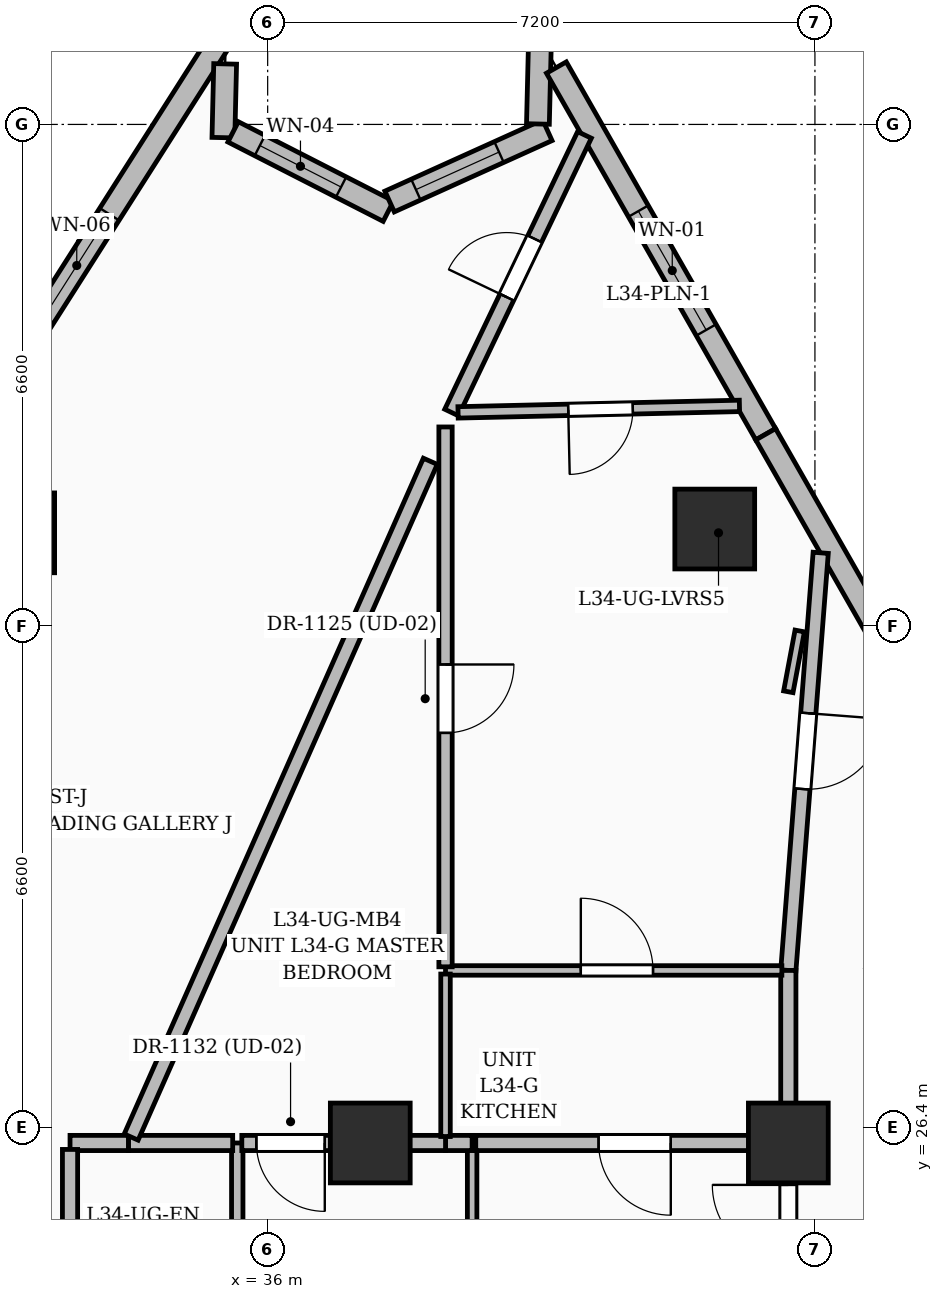
"""IFC4 building model, lengths in metres.
Left out: names, types, materials, properties, quantities, classifications, styles, units other than length and angle.
Written with IfcOpenShell. Run it as: python <this file> out.ifc"""

import sys

from ifc_helpers import new_model, si_unit, direction, frame, frame_2d, origin, origin_2d, place, context, subcontext, project, spatial, rectangle, extrude, element, fill, save


model = new_model("IFC4")
c1 = context("Model", 3, precision=1e-05, world=origin(), true_north=direction((0.0, 1.0)))
c2 = subcontext(c1, "Body", "Model", "MODEL_VIEW")
j1 = project(units=[si_unit("LENGTHUNIT", "METRE"), si_unit("PLANEANGLEUNIT", "RADIAN")], contexts=[c1])
p1 = place(None, origin())
s1 = spatial("IfcSite", under=j1, at=p1, CompositionType="ELEMENT")
p2 = place(p1, origin())
s2 = spatial("IfcBuilding", under=s1, at=p2, CompositionType="ELEMENT")
p3 = place(p2, frame((0.0, 0.0, 135.6)))
s3 = spatial("IfcBuildingStorey", under=s2, at=p3, CompositionType="ELEMENT", Elevation=135.6)
for number, where, z_axis, x_axis in (
    (1, (42.85, 26.2, 0.0), (0.0, 0.0, 1.0), (1.0, 0.0, 0.0)),
    (2, (37.35, 26.2, 0.0), (0.0, 0.0, 1.0), (1.0, 0.0, 0.0)),
    (3, (41.882, 34.277, 0.0), (0.0, 0.0, 1.0), (1.0, 0.0, 0.0)),
    (4, (32.672, 34.227, 0.0), (0.0, 0.0, 1.0), (1.0, 0.0, 0.0)),
):
    element("IfcColumn", number, at=place(p3, frame(where, z_axis=z_axis, x_axis=x_axis)), inside=s3, PredefinedType="COLUMN", context=c2, shape_type="SweptSolid", body=[
        extrude(rectangle(XDim=1.05, YDim=1.05, at=origin_2d()), origin(), (0.0, 0.0, 1.0), 3.6),
    ])
p4 = place(p3, frame((31.998, 35.403, 0.0), z_axis=(0.0, 0.0, 1.0), x_axis=(0.537115953095, 0.843508419004, 0.0)))
e5 = element("IfcWall", 5, at=p4, inside=s3, PredefinedType="SOLIDWALL", context=c2, shape_type="SweptSolid", body=[
    extrude(rectangle(XDim=6.569, YDim=0.3, at=frame_2d((3.285, 0.0))), origin(), (0.0, 0.0, 1.0), 3.35),
])
p5 = place(p4, frame((1.975, 0.0, 0.55)))
e6 = element("IfcOpeningElement", 6, at=p5, cuts=e5, PredefinedType="OPENING", context=c2, shape_type="SweptSolid", body=[
    extrude(rectangle(XDim=1.6, YDim=2.2, at=frame_2d((0.8, 1.1))), frame((0.0, 0.16, 0.0), z_axis=(0.0, -1.0, 0.0), x_axis=(1.0, 0.0, 0.0)), (0.0, 0.0, 1.0), 0.32),
])
p6 = place(p3, frame((35.441, 40.396, 0.0), z_axis=(0.0, 0.0, 1.0), x_axis=(-0.023898557354, -0.999714388691, 0.0)))
e7 = element("IfcWall", 7, at=p6, inside=s3, PredefinedType="SOLIDWALL", context=c2, shape_type="SweptSolid", body=[
    extrude(rectangle(XDim=0.97, YDim=0.3, at=frame_2d((0.485, 0.0))), origin(), (0.0, 0.0, 1.0), 3.35),
])
p7 = place(p3, frame((35.546, 39.502, 0.0), z_axis=(0.0, 0.0, 1.0), x_axis=(0.890388661124, -0.455201089786, 0.0)))
e8 = element("IfcWall", 8, at=p7, inside=s3, PredefinedType="SOLIDWALL", context=c2, shape_type="SweptSolid", body=[
    extrude(rectangle(XDim=2.293, YDim=0.3, at=frame_2d((1.147, 0.0))), origin(), (0.0, 0.0, 1.0), 3.35),
])
p8 = place(p7, frame((0.395, 0.0, 0.8)))
e9 = element("IfcOpeningElement", 9, at=p8, cuts=e8, PredefinedType="OPENING", context=c2, shape_type="SweptSolid", body=[
    extrude(rectangle(XDim=1.2, YDim=1.8, at=frame_2d((0.6, 0.9))), frame((0.0, 0.16, 0.0), z_axis=(0.0, -1.0, 0.0), x_axis=(1.0, 0.0, 0.0)), (0.0, 0.0, 1.0), 0.32),
])
p9 = place(p3, frame((37.604, 38.586, 0.0), z_axis=(0.0, 0.0, 1.0), x_axis=(0.911256421967, 0.411839451029, 0.0)))
e10 = element("IfcWall", 10, at=p9, inside=s3, PredefinedType="SOLIDWALL", context=c2, shape_type="SweptSolid", body=[
    extrude(rectangle(XDim=2.278, YDim=0.3, at=frame_2d((1.139, 0.0))), origin(), (0.0, 0.0, 1.0), 3.35),
])
p10 = place(p9, frame((0.38, 0.0, 0.8)))
e11 = element("IfcOpeningElement", 11, at=p10, cuts=e10, PredefinedType="OPENING", context=c2, shape_type="SweptSolid", body=[
    extrude(rectangle(XDim=1.2, YDim=1.8, at=frame_2d((0.6, 0.9))), frame((0.0, 0.16, 0.0), z_axis=(0.0, -1.0, 0.0), x_axis=(1.0, 0.0, 0.0)), (0.0, 0.0, 1.0), 0.32),
])
p11 = place(p3, frame((39.555, 39.606, 0.0), z_axis=(0.0, 0.0, 1.0), x_axis=(0.024600187161, 0.999697369603, 0.0)))
e12 = element("IfcWall", 12, at=p11, inside=s3, PredefinedType="SOLIDWALL", context=c2, shape_type="SweptSolid", body=[
    extrude(rectangle(XDim=1.26, YDim=0.3, at=frame_2d((0.63, 0.0))), origin(), (0.0, 0.0, 1.0), 3.35),
])
p12 = place(p3, frame((39.799, 40.348, 0.0), z_axis=(0.0, 0.0, 1.0), x_axis=(0.495693940787, -0.868497275222, 0.0)))
e13 = element("IfcWall", 13, at=p12, inside=s3, PredefinedType="SOLIDWALL", context=c2, shape_type="SweptSolid", body=[
    extrude(rectangle(XDim=5.555, YDim=0.3, at=frame_2d((2.777, 0.0))), origin(), (0.0, 0.0, 1.0), 3.35),
])
p13 = place(p12, frame((2.175, 0.0, 0.6)))
e14 = element("IfcOpeningElement", 14, at=p13, cuts=e13, PredefinedType="OPENING", context=c2, shape_type="SweptSolid", body=[
    extrude(rectangle(XDim=1.8, YDim=2.1, at=frame_2d((0.9, 1.05))), frame((0.0, 0.16, 0.0), z_axis=(0.0, -1.0, 0.0), x_axis=(1.0, 0.0, 0.0)), (0.0, 0.0, 1.0), 0.32),
])
p14 = place(p3, frame((42.552, 35.524, 0.0), z_axis=(0.0, 0.0, 1.0), x_axis=(0.495688482465, -0.86850039053, 0.0)))
e15 = element("IfcWall", 15, at=p14, inside=s3, PredefinedType="SOLIDWALL", context=c2, shape_type="SweptSolid", body=[
    extrude(rectangle(XDim=6.129, YDim=0.3, at=frame_2d((3.065, 0.0))), origin(), (0.0, 0.0, 1.0), 3.35),
])
p15 = place(p14, frame((2.975, 0.0, 0.55)))
e16 = element("IfcOpeningElement", 16, at=p15, cuts=e15, PredefinedType="OPENING", context=c2, shape_type="SweptSolid", body=[
    extrude(rectangle(XDim=1.6, YDim=2.2, at=frame_2d((0.8, 1.1))), frame((0.0, 0.16, 0.0), z_axis=(0.0, -1.0, 0.0), x_axis=(1.0, 0.0, 0.0)), (0.0, 0.0, 1.0), 0.32),
])
p16 = place(p3, frame((38.69, 26.2, 0.0), z_axis=(0.0, 0.0, 1.0), x_axis=(0.0, -1.0, 0.0)))
e17 = element("IfcWall", 17, at=p16, inside=s3, PredefinedType="PARTITIONING", context=c2, shape_type="SweptSolid", body=[
    extrude(rectangle(XDim=4.343, YDim=0.125, at=frame_2d((2.171, 0.0))), origin(), (0.0, 0.0, 1.0), 2.436),
])
p17 = place(p3, frame((42.85, 24.285, 0.0), z_axis=(0.0, 0.0, 1.0), x_axis=(0.0, 1.0, 0.0)))
e18 = element("IfcWall", 18, at=p17, inside=s3, PredefinedType="PARTITIONING", context=c2, shape_type="SweptSolid", body=[
    extrude(rectangle(XDim=1.915, YDim=0.2, at=frame_2d((0.958, 0.0))), origin(), (0.0, 0.0, 1.0), 2.436),
])
p18 = place(p17, frame((0.364, 0.0, 0.0)))
e19 = element("IfcOpeningElement", 19, at=p18, cuts=e18, PredefinedType="OPENING", context=c2, shape_type="SweptSolid", body=[
    extrude(rectangle(XDim=1.0, YDim=2.2, at=frame_2d((0.5, 1.1))), frame((0.0, 0.11, 0.0), z_axis=(0.0, -1.0, 0.0), x_axis=(1.0, 0.0, 0.0)), (0.0, 0.0, 1.0), 0.22),
])
p19 = place(p3, frame((42.765, 26.2, 0.0), z_axis=(0.0, 0.0, 1.0), x_axis=(-1.0, 0.0, 0.0)))
e20 = element("IfcWall", 20, at=p19, inside=s3, PredefinedType="PARTITIONING", context=c2, shape_type="SweptSolid", body=[
    extrude(rectangle(XDim=4.027, YDim=0.2, at=frame_2d((2.014, 0.0))), origin(), (0.0, 0.0, 1.0), 2.436),
])
p20 = place(p19, frame((1.461, 0.0, 0.0)))
e21 = element("IfcOpeningElement", 21, at=p20, cuts=e20, PredefinedType="OPENING", context=c2, shape_type="SweptSolid", body=[
    extrude(rectangle(XDim=0.95, YDim=2.2, at=frame_2d((0.475, 1.1))), frame((0.0, 0.11, 0.0), z_axis=(0.0, -1.0, 0.0), x_axis=(1.0, 0.0, 0.0)), (0.0, 0.0, 1.0), 0.22),
])
p21 = place(p3, frame((35.6, 21.84, 0.0), z_axis=(0.0, 0.0, 1.0), x_axis=(0.0, 1.0, 0.0)))
e22 = element("IfcWall", 22, at=p21, inside=s3, PredefinedType="PARTITIONING", context=c2, shape_type="SweptSolid", body=[
    extrude(rectangle(XDim=4.36, YDim=0.15, at=frame_2d((2.18, 0.0))), origin(), (0.0, 0.0, 1.0), 2.436),
])
p22 = place(p21, frame((1.74, 0.0, 0.0)))
e23 = element("IfcOpeningElement", 23, at=p22, cuts=e22, PredefinedType="OPENING", context=c2, shape_type="SweptSolid", body=[
    extrude(rectangle(XDim=0.85, YDim=2.1, at=frame_2d((0.425, 1.05))), frame((0.0, 0.085, 0.0), z_axis=(0.0, -1.0, 0.0), x_axis=(1.0, 0.0, 0.0)), (0.0, 0.0, 1.0), 0.17),
])
p23 = place(p3, frame((38.69, 26.2, 0.0), z_axis=(0.0, 0.0, 1.0), x_axis=(-1.0, 0.0, 0.0)))
e24 = element("IfcWall", 24, at=p23, inside=s3, PredefinedType="PARTITIONING", context=c2, shape_type="SweptSolid", body=[
    extrude(rectangle(XDim=0.35, YDim=0.2, at=frame_2d((0.175, 0.0))), origin(), (0.0, 0.0, 1.0), 2.436),
])
p24 = place(p3, frame((38.34, 26.2, 0.0), z_axis=(0.0, 0.0, 1.0), x_axis=(-1.0, 0.0, 0.0)))
e25 = element("IfcWall", 25, at=p24, inside=s3, PredefinedType="PARTITIONING", context=c2, shape_type="SweptSolid", body=[
    extrude(rectangle(XDim=2.68, YDim=0.2, at=frame_2d((1.34, 0.0))), origin(), (0.0, 0.0, 1.0), 2.436),
])
p25 = place(p24, frame((1.589, 0.0, 0.0)))
e26 = element("IfcOpeningElement", 26, at=p25, cuts=e25, PredefinedType="OPENING", context=c2, shape_type="SweptSolid", body=[
    extrude(rectangle(XDim=0.9, YDim=2.15, at=frame_2d((0.45, 1.075))), frame((0.0, 0.11, 0.0), z_axis=(0.0, -1.0, 0.0), x_axis=(1.0, 0.0, 0.0)), (0.0, 0.0, 1.0), 0.22),
])
p26 = place(p3, frame((34.17, 26.2, 0.0), z_axis=(0.0, 0.0, 1.0), x_axis=(-1.0, 0.0, 0.0)))
e27 = element("IfcWall", 27, at=p26, inside=s3, PredefinedType="PARTITIONING", context=c2, shape_type="SweptSolid", body=[
    extrude(rectangle(XDim=0.77, YDim=0.2, at=frame_2d((0.385, 0.0))), origin(), (0.0, 0.0, 1.0), 3.35),
])
p27 = place(p3, frame((33.4, 26.115, 0.0), z_axis=(0.0, 0.0, 1.0), x_axis=(0.0, -1.0, 0.0)))
e28 = element("IfcWall", 28, at=p27, inside=s3, PredefinedType="PARTITIONING", context=c2, shape_type="SweptSolid", body=[
    extrude(rectangle(XDim=4.245, YDim=0.2, at=frame_2d((2.123, 0.0))), origin(), (0.0, 0.0, 1.0), 2.709),
])
p28 = place(p3, frame((35.54, 26.2, 0.0), z_axis=(0.0, 0.0, 1.0), x_axis=(-1.0, 0.0, 0.0)))
e29 = element("IfcWall", 29, at=p28, inside=s3, PredefinedType="PARTITIONING", context=c2, shape_type="SweptSolid", body=[
    extrude(rectangle(XDim=1.37, YDim=0.2, at=frame_2d((0.685, 0.0))), origin(), (0.0, 0.0, 1.0), 2.709),
])
p29 = place(p3, frame((43.276, 33.964, 0.0), z_axis=(0.0, 0.0, 1.0), x_axis=(-0.077265658671, -0.997010540561, 0.0)))
e30 = element("IfcWall", 30, at=p29, inside=s3, PredefinedType="PARTITIONING", context=c2, shape_type="SweptSolid", body=[
    extrude(rectangle(XDim=5.51, YDim=0.2, at=frame_2d((2.755, 0.0))), origin(), (0.0, 0.0, 1.0), 2.372),
])
p30 = place(p29, frame((2.116, 0.0, 0.0)))
e31 = element("IfcOpeningElement", 31, at=p30, cuts=e30, PredefinedType="OPENING", context=c2, shape_type="SweptSolid", body=[
    extrude(rectangle(XDim=1.0, YDim=2.2, at=frame_2d((0.5, 1.1))), frame((0.0, 0.11, 0.0), z_axis=(0.0, -1.0, 0.0), x_axis=(1.0, 0.0, 0.0)), (0.0, 0.0, 1.0), 0.22),
])
p31 = place(p3, frame((42.85, 28.47, 0.0), z_axis=(0.0, 0.0, 1.0), x_axis=(0.0, -1.0, 0.0)))
e32 = element("IfcWall", 32, at=p31, inside=s3, PredefinedType="PARTITIONING", context=c2, shape_type="SweptSolid", body=[
    extrude(rectangle(XDim=2.27, YDim=0.2, at=frame_2d((1.135, 0.0))), origin(), (0.0, 0.0, 1.0), 2.372),
])
p32 = place(p3, frame((38.42, 35.81, 0.0), z_axis=(0.0, 0.0, 1.0), x_axis=(0.431758464621, 0.901989261703, 0.0)))
e33 = element("IfcWall", 33, at=p32, inside=s3, PredefinedType="PARTITIONING", context=c2, shape_type="SweptSolid", body=[
    extrude(rectangle(XDim=4.049, YDim=0.2, at=frame_2d((2.024, 0.0))), origin(), (0.0, 0.0, 1.0), 3.35),
])
p33 = place(p32, frame((1.682, 0.0, 0.0)))
e34 = element("IfcOpeningElement", 34, at=p33, cuts=e33, PredefinedType="OPENING", context=c2, shape_type="SweptSolid", body=[
    extrude(rectangle(XDim=0.85, YDim=2.1, at=frame_2d((0.425, 1.05))), frame((0.0, 0.11, 0.0), z_axis=(0.0, -1.0, 0.0), x_axis=(1.0, 0.0, 0.0)), (0.0, 0.0, 1.0), 0.22),
])
p34 = place(p3, frame((34.204, 26.278, 0.0), z_axis=(0.0, 0.0, 1.0), x_axis=(0.404777402146, 0.914415252887, 0.0)))
e35 = element("IfcWall", 35, at=p34, inside=s3, PredefinedType="PARTITIONING", context=c2, shape_type="SweptSolid", body=[
    extrude(rectangle(XDim=9.723, YDim=0.2, at=frame_2d((4.861, 0.0))), origin(), (0.0, 0.0, 1.0), 2.372),
])
p35 = place(p3, frame((42.207, 35.897, 0.0), z_axis=(0.0, 0.0, 1.0), x_axis=(-0.999733740531, -0.023074835742, 0.0)))
e36 = element("IfcWall", 36, at=p35, inside=s3, PredefinedType="PARTITIONING", context=c2, shape_type="SweptSolid", body=[
    extrude(rectangle(XDim=3.703, YDim=0.15, at=frame_2d((1.852, 0.0))), origin(), (0.0, 0.0, 1.0), 3.35),
])
p36 = place(p35, frame((1.403, 0.0, 0.0)))
e37 = element("IfcOpeningElement", 37, at=p36, cuts=e36, PredefinedType="OPENING", context=c2, shape_type="SweptSolid", body=[
    extrude(rectangle(XDim=0.85, YDim=2.1, at=frame_2d((0.425, 1.05))), frame((0.0, 0.085, 0.0), z_axis=(0.0, -1.0, 0.0), x_axis=(1.0, 0.0, 0.0)), (0.0, 0.0, 1.0), 0.17),
])
p37 = place(p3, frame((38.34, 28.47, 0.0), z_axis=(0.0, 0.0, 1.0), x_axis=(1.0, 0.0, 0.0)))
e38 = element("IfcWall", 38, at=p37, inside=s3, PredefinedType="PARTITIONING", context=c2, shape_type="SweptSolid", body=[
    extrude(rectangle(XDim=4.425, YDim=0.125, at=frame_2d((2.212, 0.0))), origin(), (0.0, 0.0, 1.0), 2.372),
])
p38 = place(p37, frame((1.78, 0.0, 0.0)))
e39 = element("IfcOpeningElement", 39, at=p38, cuts=e38, PredefinedType="OPENING", context=c2, shape_type="SweptSolid", body=[
    extrude(rectangle(XDim=0.95, YDim=2.2, at=frame_2d((0.475, 1.1))), frame((0.0, 0.072, 0.0), z_axis=(0.0, -1.0, 0.0), x_axis=(1.0, 0.0, 0.0)), (0.0, 0.0, 1.0), 0.145),
])
p39 = place(p3, frame((38.34, 35.62, 0.0), z_axis=(0.0, 0.0, 1.0), x_axis=(0.0, -1.0, 0.0)))
e40 = element("IfcWall", 40, at=p39, inside=s3, PredefinedType="PARTITIONING", context=c2, shape_type="SweptSolid", body=[
    extrude(rectangle(XDim=7.103, YDim=0.175, at=frame_2d((3.551, 0.0))), origin(), (0.0, 0.0, 1.0), 2.57),
])
p40 = place(p39, frame((3.125, 0.0, 0.0)))
e41 = element("IfcOpeningElement", 41, at=p40, cuts=e40, PredefinedType="OPENING", context=c2, shape_type="SweptSolid", body=[
    extrude(rectangle(XDim=0.9, YDim=2.15, at=frame_2d((0.45, 1.075))), frame((0.0, 0.097, 0.0), z_axis=(0.0, -1.0, 0.0), x_axis=(1.0, 0.0, 0.0)), (0.0, 0.0, 1.0), 0.195),
])
p41 = place(p3, frame((38.34, 28.423, 0.0), z_axis=(0.0, 0.0, 1.0), x_axis=(0.0, -1.0, 0.0)))
e42 = element("IfcWall", 42, at=p41, inside=s3, PredefinedType="PARTITIONING", context=c2, shape_type="SweptSolid", body=[
    extrude(rectangle(XDim=2.138, YDim=0.125, at=frame_2d((1.069, 0.0))), origin(), (0.0, 0.0, 1.0), 2.436),
])
p42 = place(p3, frame((43.0, 32.936, 0.0), z_axis=(0.0, 0.0, 1.0), x_axis=(-0.184161767382, -0.98289594741, 0.0)))
e43 = element("IfcWall", 43, at=p42, inside=s3, PredefinedType="PARTITIONING", context=c2, shape_type="SweptSolid", body=[
    extrude(rectangle(XDim=0.814, YDim=0.125, at=frame_2d((0.407, 0.0))), origin(), (0.0, 0.0, 1.0), 2.57),
])
p43 = place(p5, origin())
e44 = element("IfcWindow", 44, at=p43, inside=s3, PartitioningType="SINGLE_PANEL", PredefinedType="WINDOW", context=c2, shape_type="SweptSolid", body=[
    extrude(rectangle(XDim=1.6, YDim=2.2, at=frame_2d((0.8, 1.1))), frame((0.0, 0.03, 0.0), z_axis=(0.0, -1.0, 0.0), x_axis=(1.0, 0.0, 0.0)), (0.0, 0.0, 1.0), 0.06),
])
fill(e6, e44)
p44 = place(p8, origin())
e45 = element("IfcWindow", 45, at=p44, inside=s3, PartitioningType="SINGLE_PANEL", PredefinedType="WINDOW", context=c2, shape_type="SweptSolid", body=[
    extrude(rectangle(XDim=1.2, YDim=1.8, at=frame_2d((0.6, 0.9))), frame((0.0, 0.03, 0.0), z_axis=(0.0, -1.0, 0.0), x_axis=(1.0, 0.0, 0.0)), (0.0, 0.0, 1.0), 0.06),
])
fill(e9, e45)
p45 = place(p10, origin())
e46 = element("IfcWindow", 46, at=p45, inside=s3, PartitioningType="SINGLE_PANEL", PredefinedType="WINDOW", context=c2, shape_type="SweptSolid", body=[
    extrude(rectangle(XDim=1.2, YDim=1.8, at=frame_2d((0.6, 0.9))), frame((0.0, 0.03, 0.0), z_axis=(0.0, -1.0, 0.0), x_axis=(1.0, 0.0, 0.0)), (0.0, 0.0, 1.0), 0.06),
])
fill(e11, e46)
p46 = place(p13, origin())
e47 = element("IfcWindow", 47, at=p46, inside=s3, PartitioningType="SINGLE_PANEL", PredefinedType="WINDOW", context=c2, shape_type="SweptSolid", body=[
    extrude(rectangle(XDim=1.8, YDim=2.1, at=frame_2d((0.9, 1.05))), frame((0.0, 0.03, 0.0), z_axis=(0.0, -1.0, 0.0), x_axis=(1.0, 0.0, 0.0)), (0.0, 0.0, 1.0), 0.06),
])
fill(e14, e47)
p47 = place(p38, origin())
e48 = element("IfcDoor", 48, at=p47, inside=s3, OperationType="SINGLE_SWING_LEFT", PredefinedType="DOOR", context=c2, shape_type="SweptSolid", body=[
    extrude(rectangle(XDim=0.95, YDim=2.2, at=frame_2d((0.475, 1.1))), frame((0.0, 0.025, 0.0), z_axis=(0.0, -1.0, 0.0), x_axis=(1.0, 0.0, 0.0)), (0.0, 0.0, 1.0), 0.05),
])
fill(e39, e48)
p48 = place(p36, origin())
e49 = element("IfcDoor", 49, at=p48, inside=s3, OperationType="SINGLE_SWING_RIGHT", PredefinedType="DOOR", context=c2, shape_type="SweptSolid", body=[
    extrude(rectangle(XDim=0.85, YDim=2.1, at=frame_2d((0.425, 1.05))), frame((0.0, 0.025, 0.0), z_axis=(0.0, -1.0, 0.0), x_axis=(1.0, 0.0, 0.0)), (0.0, 0.0, 1.0), 0.05),
])
fill(e37, e49)
p49 = place(p40, origin())
e50 = element("IfcDoor", 50, at=p49, inside=s3, OperationType="SINGLE_SWING_LEFT", PredefinedType="DOOR", context=c2, shape_type="SweptSolid", body=[
    extrude(rectangle(XDim=0.9, YDim=2.15, at=frame_2d((0.45, 1.075))), frame((0.0, 0.025, 0.0), z_axis=(0.0, -1.0, 0.0), x_axis=(1.0, 0.0, 0.0)), (0.0, 0.0, 1.0), 0.05),
])
fill(e41, e50)
p50 = place(p18, origin())
e51 = element("IfcDoor", 51, at=p50, inside=s3, OperationType="SINGLE_SWING_RIGHT", PredefinedType="DOOR", context=c2, shape_type="SweptSolid", body=[
    extrude(rectangle(XDim=1.0, YDim=2.2, at=frame_2d((0.5, 1.1))), frame((0.0, 0.025, 0.0), z_axis=(0.0, -1.0, 0.0), x_axis=(1.0, 0.0, 0.0)), (0.0, 0.0, 1.0), 0.05),
])
fill(e19, e51)
p51 = place(p30, origin())
e52 = element("IfcDoor", 52, at=p51, inside=s3, OperationType="SINGLE_SWING_LEFT", PredefinedType="DOOR", context=c2, shape_type="SweptSolid", body=[
    extrude(rectangle(XDim=1.0, YDim=2.2, at=frame_2d((0.5, 1.1))), frame((0.0, 0.025, 0.0), z_axis=(0.0, -1.0, 0.0), x_axis=(1.0, 0.0, 0.0)), (0.0, 0.0, 1.0), 0.05),
])
fill(e31, e52)
p52 = place(p33, origin())
e53 = element("IfcDoor", 53, at=p52, inside=s3, OperationType="SINGLE_SWING_LEFT", PredefinedType="DOOR", context=c2, shape_type="SweptSolid", body=[
    extrude(rectangle(XDim=0.85, YDim=2.1, at=frame_2d((0.425, 1.05))), frame((0.0, 0.025, 0.0), z_axis=(0.0, -1.0, 0.0), x_axis=(1.0, 0.0, 0.0)), (0.0, 0.0, 1.0), 0.05),
])
fill(e34, e53)
p53 = place(p20, origin())
e54 = element("IfcDoor", 54, at=p53, inside=s3, OperationType="SINGLE_SWING_LEFT", PredefinedType="DOOR", context=c2, shape_type="SweptSolid", body=[
    extrude(rectangle(XDim=0.95, YDim=2.2, at=frame_2d((0.475, 1.1))), frame((0.0, 0.025, 0.0), z_axis=(0.0, -1.0, 0.0), x_axis=(1.0, 0.0, 0.0)), (0.0, 0.0, 1.0), 0.05),
])
fill(e21, e54)
p54 = place(p25, origin())
e55 = element("IfcDoor", 55, at=p54, inside=s3, OperationType="SINGLE_SWING_LEFT", PredefinedType="DOOR", context=c2, shape_type="SweptSolid", body=[
    extrude(rectangle(XDim=0.9, YDim=2.15, at=frame_2d((0.45, 1.075))), frame((0.0, 0.025, 0.0), z_axis=(0.0, -1.0, 0.0), x_axis=(1.0, 0.0, 0.0)), (0.0, 0.0, 1.0), 0.05),
])
fill(e26, e55)
save(model, sys.argv[1])
